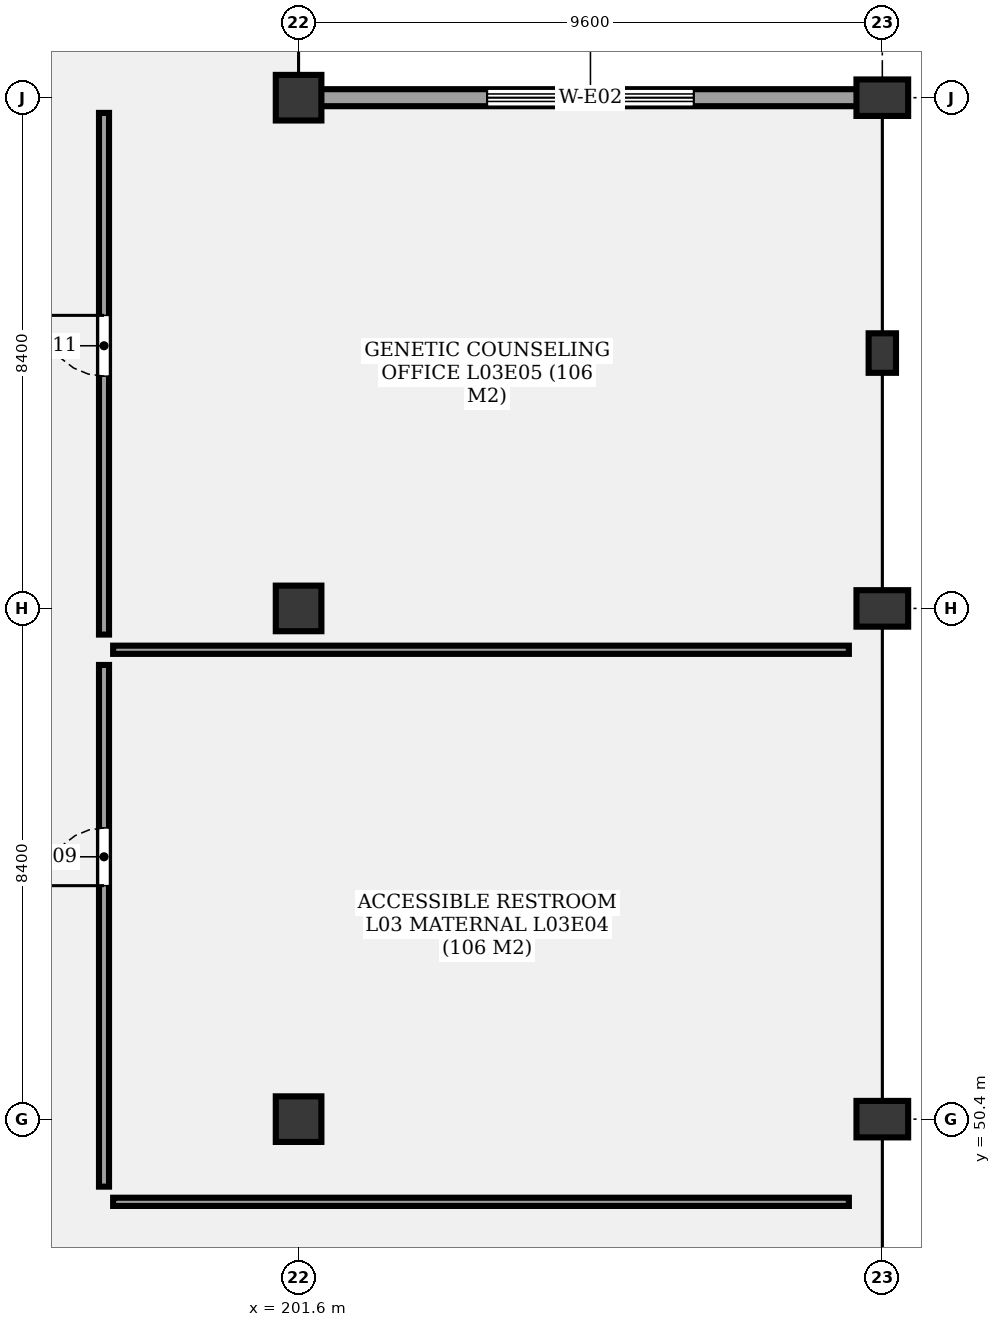
"""IFC4 building model, lengths in metres.
Left out: names, types, materials, properties, quantities, classifications, styles, units other than length and angle.
Written with IfcOpenShell. Run it as: python <this file> out.ifc"""

import sys

from ifc_helpers import new_model, si_unit, direction, frame, frame_2d, origin, origin_2d, place, context, subcontext, project, spatial, rectangle, extrude, element, fill, save


model = new_model("IFC4")
c1 = context("Model", 3, precision=1e-05, world=origin(), true_north=direction((0.0, 1.0)))
c2 = subcontext(c1, "Body", "Model", "MODEL_VIEW")
j1 = project(units=[si_unit("LENGTHUNIT", "METRE"), si_unit("PLANEANGLEUNIT", "RADIAN")], contexts=[c1])
p1 = place(None, origin())
s1 = spatial("IfcSite", under=j1, at=p1, CompositionType="ELEMENT")
p2 = place(p1, origin())
s2 = spatial("IfcBuilding", under=s1, at=p2, CompositionType="ELEMENT")
p3 = place(p2, frame((0.0, 0.0, 13.5)))
s3 = spatial("IfcBuildingStorey", under=s2, at=p3, CompositionType="ELEMENT", Elevation=13.5)
for number, where, z_axis, x_axis in (
    (1, (201.6, 50.4, 0.0), (0.0, 0.0, 1.0), (1.0, 0.0, 0.0)),
    (2, (201.6, 58.8, 0.0), (0.0, 0.0, 1.0), (1.0, 0.0, 0.0)),
    (3, (201.6, 67.2, 0.0), (0.0, 0.0, 1.0), (1.0, 0.0, 0.0)),
):
    element("IfcColumn", number, at=place(p3, frame(where, z_axis=z_axis, x_axis=x_axis)), inside=s3, PredefinedType="COLUMN", context=c2, shape_type="SweptSolid", body=[
        extrude(rectangle(XDim=0.75, YDim=0.75, at=origin_2d()), origin(), (0.0, 0.0, 1.0), 4.3),
    ])
for number, where, z_axis, x_axis in (
    (4, (211.2, 50.4, 0.0), (0.0, 0.0, 1.0), (1.0, 0.0, 0.0)),
    (5, (211.2, 58.8, 0.0), (0.0, 0.0, 1.0), (1.0, 0.0, 0.0)),
    (6, (211.2, 67.2, 0.0), (0.0, 0.0, 1.0), (1.0, 0.0, 0.0)),
):
    element("IfcColumn", number, at=place(p3, frame(where, z_axis=z_axis, x_axis=x_axis)), inside=s3, PredefinedType="COLUMN", context=c2, shape_type="SweptSolid", body=[
        extrude(rectangle(XDim=0.85, YDim=0.6, at=origin_2d()), origin(), (0.0, 0.0, 1.0), 4.3),
    ])
p4 = place(p3, frame((211.2, 63.0, 0.0), z_axis=(0.0, 0.0, 1.0), x_axis=(1.0, 0.0, 0.0)))
e7 = element("IfcColumn", 7, at=p4, inside=s3, PredefinedType="PILASTER", context=c2, shape_type="SweptSolid", body=[
    extrude(rectangle(XDim=0.45, YDim=0.65, at=origin_2d()), origin(), (0.0, 0.0, 1.0), 4.3),
])
p5 = place(p3, frame((201.6, 67.2, 0.0), z_axis=(0.0, 0.0, 1.0), x_axis=(1.0, 0.0, 0.0)))
e8 = element("IfcWall", 8, at=p5, inside=s3, PredefinedType="SOLIDWALL", context=c2, shape_type="SweptSolid", body=[
    extrude(rectangle(XDim=9.6, YDim=0.28, at=frame_2d((4.8, 0.0))), origin(), (0.0, 0.0, 1.0), 3.49),
])
p6 = place(p5, frame((3.1, 0.0, 0.85)))
e9 = element("IfcOpeningElement", 9, at=p6, cuts=e8, PredefinedType="OPENING", context=c2, shape_type="SweptSolid", body=[
    extrude(rectangle(XDim=3.4, YDim=1.4, at=frame_2d((1.7, 0.7))), frame((0.0, 0.15, 0.0), z_axis=(0.0, -1.0, 0.0), x_axis=(1.0, 0.0, 0.0)), (0.0, 0.0, 1.0), 0.3),
])
p7 = place(p3, frame((198.4, 49.29, 0.0), z_axis=(0.0, 0.0, 1.0), x_axis=(0.0, 1.0, 0.0)))
e10 = element("IfcWall", 10, at=p7, inside=s3, PredefinedType="PARTITIONING", context=c2, shape_type="SweptSolid", body=[
    extrude(rectangle(XDim=8.58, YDim=0.165, at=frame_2d((4.29, 0.0))), origin(), (0.0, 0.0, 1.0), 3.4),
])
p8 = place(p7, frame((4.95, 0.0, 0.0)))
e11 = element("IfcOpeningElement", 11, at=p8, cuts=e10, PredefinedType="OPENING", context=c2, shape_type="SweptSolid", body=[
    extrude(rectangle(XDim=0.95, YDim=2.1, at=frame_2d((0.475, 1.05))), frame((0.0, 0.093, 0.0), z_axis=(0.0, -1.0, 0.0), x_axis=(1.0, 0.0, 0.0)), (0.0, 0.0, 1.0), 0.185),
])
p9 = place(p3, frame((198.55, 49.04, 0.0), z_axis=(0.0, 0.0, 1.0), x_axis=(1.0, 0.0, 0.0)))
e12 = element("IfcWall", 12, at=p9, inside=s3, PredefinedType="PARTITIONING", context=c2, shape_type="SweptSolid", body=[
    extrude(rectangle(XDim=12.1, YDim=0.135, at=frame_2d((6.05, 0.0))), origin(), (0.0, 0.0, 1.0), 3.4),
])
p10 = place(p3, frame((198.4, 58.37, 0.0), z_axis=(0.0, 0.0, 1.0), x_axis=(0.0, 1.0, 0.0)))
e13 = element("IfcWall", 13, at=p10, inside=s3, PredefinedType="PARTITIONING", context=c2, shape_type="SweptSolid", body=[
    extrude(rectangle(XDim=8.58, YDim=0.165, at=frame_2d((4.29, 0.0))), origin(), (0.0, 0.0, 1.0), 3.4),
])
p11 = place(p10, frame((4.25, 0.0, 0.0)))
e14 = element("IfcOpeningElement", 14, at=p11, cuts=e13, PredefinedType="OPENING", context=c2, shape_type="SweptSolid", body=[
    extrude(rectangle(XDim=1.0, YDim=2.2, at=frame_2d((0.5, 1.1))), frame((0.0, 0.093, 0.0), z_axis=(0.0, -1.0, 0.0), x_axis=(1.0, 0.0, 0.0)), (0.0, 0.0, 1.0), 0.185),
])
p12 = place(p3, frame((198.55, 58.12, 0.0), z_axis=(0.0, 0.0, 1.0), x_axis=(1.0, 0.0, 0.0)))
e15 = element("IfcWall", 15, at=p12, inside=s3, PredefinedType="PARTITIONING", context=c2, shape_type="SweptSolid", body=[
    extrude(rectangle(XDim=12.1, YDim=0.135, at=frame_2d((6.05, 0.0))), origin(), (0.0, 0.0, 1.0), 3.4),
])
p13 = place(p6, origin())
e16 = element("IfcWindow", 16, at=p13, inside=s3, PartitioningType="SINGLE_PANEL", PredefinedType="WINDOW", context=c2, shape_type="SweptSolid", body=[
    extrude(rectangle(XDim=3.4, YDim=1.4, at=frame_2d((1.7, 0.7))), frame((0.0, 0.03, 0.0), z_axis=(0.0, -1.0, 0.0), x_axis=(1.0, 0.0, 0.0)), (0.0, 0.0, 1.0), 0.06),
])
fill(e9, e16)
p14 = place(p8, origin())
e17 = element("IfcDoor", 17, at=p14, inside=s3, OperationType="SINGLE_SWING_LEFT", PredefinedType="DOOR", context=c2, shape_type="SweptSolid", body=[
    extrude(rectangle(XDim=0.95, YDim=2.1, at=frame_2d((0.475, 1.05))), frame((0.0, 0.025, 0.0), z_axis=(0.0, -1.0, 0.0), x_axis=(1.0, 0.0, 0.0)), (0.0, 0.0, 1.0), 0.05),
])
fill(e11, e17)
p15 = place(p11, origin())
e18 = element("IfcDoor", 18, at=p15, inside=s3, OperationType="SINGLE_SWING_RIGHT", PredefinedType="DOOR", context=c2, shape_type="SweptSolid", body=[
    extrude(rectangle(XDim=1.0, YDim=2.2, at=frame_2d((0.5, 1.1))), frame((0.0, 0.025, 0.0), z_axis=(0.0, -1.0, 0.0), x_axis=(1.0, 0.0, 0.0)), (0.0, 0.0, 1.0), 0.05),
])
fill(e14, e18)
save(model, sys.argv[1])
